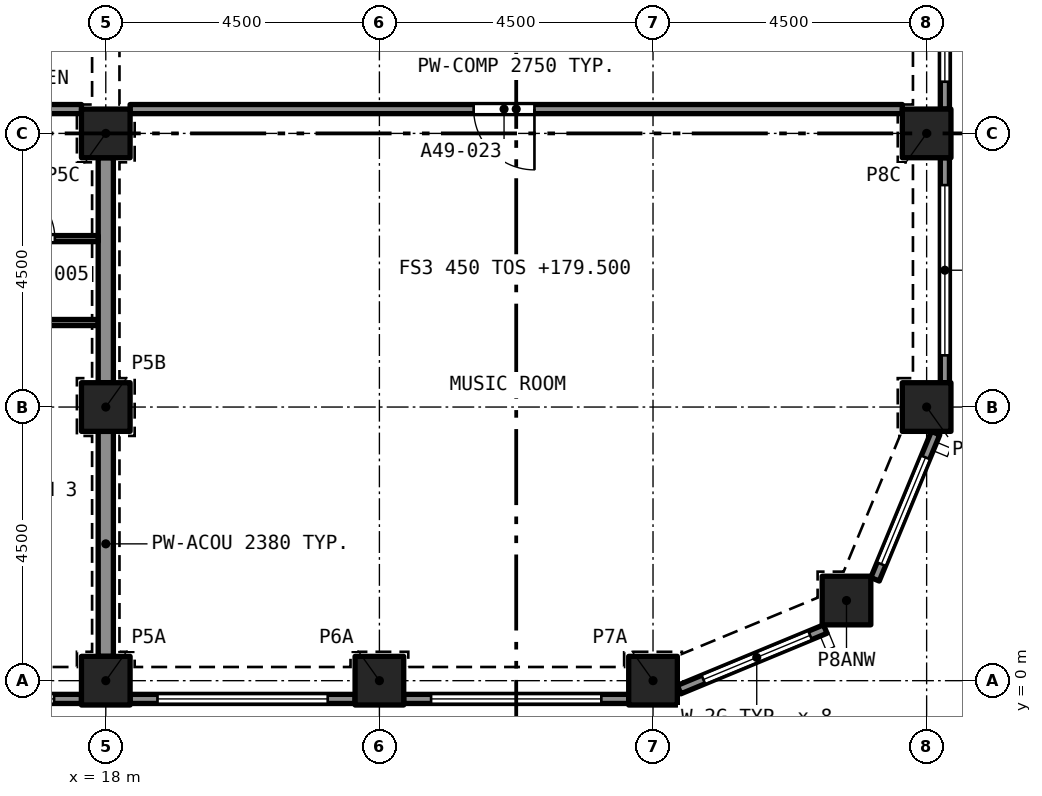
"""IFC4 building model, lengths in metres.
Left out: names, types, materials, properties, quantities, classifications, styles, units other than length and angle.
Written with IfcOpenShell. Run it as: python <this file> out.ifc"""

import sys

from ifc_helpers import new_model, si_unit, direction, frame, frame_2d, origin, origin_2d, place, context, subcontext, project, spatial, rectangle, extrude, element, fill, save


model = new_model("IFC4")
c1 = context("Model", 3, precision=1e-05, world=origin(), true_north=direction((0.0, 1.0)))
c2 = subcontext(c1, "Body", "Model", "MODEL_VIEW")
j1 = project(units=[si_unit("LENGTHUNIT", "METRE"), si_unit("PLANEANGLEUNIT", "RADIAN")], contexts=[c1])
p1 = place(None, origin())
s1 = spatial("IfcSite", under=j1, at=p1, CompositionType="ELEMENT")
p2 = place(p1, origin())
s2 = spatial("IfcBuilding", under=s1, at=p2, CompositionType="ELEMENT")
p3 = place(p2, frame((0.0, 0.0, 179.5)))
s3 = spatial("IfcBuildingStorey", under=s2, at=p3, CompositionType="ELEMENT", Elevation=179.5)
for number, where, z_axis, x_axis in (
    (1, (18.0, 0.0, 0.0), (0.0, 0.0, 1.0), (1.0, 0.0, 0.0)),
    (2, (22.5, 0.0, 0.0), (0.0, 0.0, 1.0), (1.0, 0.0, 0.0)),
    (3, (27.0, 0.0, 0.0), (0.0, 0.0, 1.0), (1.0, 0.0, 0.0)),
    (4, (30.182, 1.318, 0.0), (0.0, 0.0, 1.0), (1.0, 0.0, 0.0)),
    (5, (18.0, 4.5, 0.0), (0.0, 0.0, 1.0), (1.0, 0.0, 0.0)),
    (6, (31.5, 4.5, 0.0), (0.0, 0.0, 1.0), (1.0, 0.0, 0.0)),
    (7, (18.0, 9.0, 0.0), (0.0, 0.0, 1.0), (1.0, 0.0, 0.0)),
    (8, (31.5, 9.0, 0.0), (0.0, 0.0, 1.0), (1.0, 0.0, 0.0)),
):
    element("IfcColumn", number, at=place(p3, frame(where, z_axis=z_axis, x_axis=x_axis)), inside=s3, PredefinedType="COLUMN", context=c2, shape_type="SweptSolid", body=[
        extrude(rectangle(XDim=0.8, YDim=0.8, at=origin_2d()), origin(), (0.0, 0.0, 1.0), 3.2),
    ])
p4 = place(p3, frame((29.833, 0.849, 0.0), z_axis=(0.0, 0.0, 1.0), x_axis=(-0.923885342263, -0.382669406082, 0.0)))
e9 = element("IfcWall", 9, at=p4, inside=s3, PredefinedType="SOLIDWALL", context=c2, shape_type="SweptSolid", body=[
    extrude(rectangle(XDim=2.602, YDim=0.15, at=frame_2d((1.301, 0.0))), origin(), (0.0, 0.0, 1.0), 3.2),
])
p5 = place(p4, frame((0.27, 0.0, 0.45)))
e10 = element("IfcOpeningElement", 10, at=p5, cuts=e9, PredefinedType="OPENING", context=c2, shape_type="SweptSolid", body=[
    extrude(rectangle(XDim=1.9, YDim=1.95, at=frame_2d((0.95, 0.975))), frame((0.0, 0.085, 0.0), z_axis=(0.0, -1.0, 0.0), x_axis=(1.0, 0.0, 0.0)), (0.0, 0.0, 1.0), 0.17),
])
p6 = place(p3, frame((31.647, 4.071, 0.0), z_axis=(0.0, 0.0, 1.0), x_axis=(-0.382669406082, -0.923885342263, 0.0)))
e11 = element("IfcWall", 11, at=p6, inside=s3, PredefinedType="SOLIDWALL", context=c2, shape_type="SweptSolid", body=[
    extrude(rectangle(XDim=2.602, YDim=0.15, at=frame_2d((1.301, 0.0))), origin(), (0.0, 0.0, 1.0), 3.2),
])
p7 = place(p6, frame((0.432, 0.0, 0.45)))
e12 = element("IfcOpeningElement", 12, at=p7, cuts=e11, PredefinedType="OPENING", context=c2, shape_type="SweptSolid", body=[
    extrude(rectangle(XDim=1.9, YDim=1.95, at=frame_2d((0.95, 0.975))), frame((0.0, 0.085, 0.0), z_axis=(0.0, -1.0, 0.0), x_axis=(1.0, 0.0, 0.0)), (0.0, 0.0, 1.0), 0.17),
])
p8 = place(p3, frame((31.8, 8.6, 0.0), z_axis=(0.0, 0.0, 1.0), x_axis=(0.0, -1.0, 0.0)))
e13 = element("IfcWall", 13, at=p8, inside=s3, PredefinedType="SOLIDWALL", context=c2, shape_type="SweptSolid", body=[
    extrude(rectangle(XDim=3.7, YDim=0.15, at=frame_2d((1.85, 0.0))), origin(), (0.0, 0.0, 1.0), 3.2),
])
p9 = place(p8, frame((0.45, 0.0, 0.45)))
e14 = element("IfcOpeningElement", 14, at=p9, cuts=e13, PredefinedType="OPENING", context=c2, shape_type="SweptSolid", body=[
    extrude(rectangle(XDim=2.8, YDim=1.95, at=frame_2d((1.4, 0.975))), frame((0.0, 0.085, 0.0), z_axis=(0.0, -1.0, 0.0), x_axis=(1.0, 0.0, 0.0)), (0.0, 0.0, 1.0), 0.17),
])
p10 = place(p3, frame((31.8, 13.1, 0.0), z_axis=(0.0, 0.0, 1.0), x_axis=(0.0, -1.0, 0.0)))
e15 = element("IfcWall", 15, at=p10, inside=s3, PredefinedType="SOLIDWALL", context=c2, shape_type="SweptSolid", body=[
    extrude(rectangle(XDim=3.7, YDim=0.15, at=frame_2d((1.85, 0.0))), origin(), (0.0, 0.0, 1.0), 3.2),
])
p11 = place(p10, frame((0.45, 0.0, 0.45)))
e16 = element("IfcOpeningElement", 16, at=p11, cuts=e15, PredefinedType="OPENING", context=c2, shape_type="SweptSolid", body=[
    extrude(rectangle(XDim=2.8, YDim=1.95, at=frame_2d((1.4, 0.975))), frame((0.0, 0.085, 0.0), z_axis=(0.0, -1.0, 0.0), x_axis=(1.0, 0.0, 0.0)), (0.0, 0.0, 1.0), 0.17),
])
p12 = place(p3, frame((17.6, -0.3, 0.0), z_axis=(0.0, 0.0, 1.0), x_axis=(-1.0, 0.0, 0.0)))
e17 = element("IfcWall", 17, at=p12, inside=s3, PredefinedType="SOLIDWALL", context=c2, shape_type="SweptSolid", body=[
    extrude(rectangle(XDim=3.7, YDim=0.15, at=frame_2d((1.85, 0.0))), origin(), (0.0, 0.0, 1.0), 3.2),
])
p13 = place(p12, frame((0.45, 0.0, 0.45)))
e18 = element("IfcOpeningElement", 18, at=p13, cuts=e17, PredefinedType="OPENING", context=c2, shape_type="SweptSolid", body=[
    extrude(rectangle(XDim=2.8, YDim=1.95, at=frame_2d((1.4, 0.975))), frame((0.0, 0.085, 0.0), z_axis=(0.0, -1.0, 0.0), x_axis=(1.0, 0.0, 0.0)), (0.0, 0.0, 1.0), 0.17),
])
p14 = place(p3, frame((22.1, -0.3, 0.0), z_axis=(0.0, 0.0, 1.0), x_axis=(-1.0, 0.0, 0.0)))
e19 = element("IfcWall", 19, at=p14, inside=s3, PredefinedType="SOLIDWALL", context=c2, shape_type="SweptSolid", body=[
    extrude(rectangle(XDim=3.7, YDim=0.15, at=frame_2d((1.85, 0.0))), origin(), (0.0, 0.0, 1.0), 3.2),
])
p15 = place(p14, frame((0.45, 0.0, 0.45)))
e20 = element("IfcOpeningElement", 20, at=p15, cuts=e19, PredefinedType="OPENING", context=c2, shape_type="SweptSolid", body=[
    extrude(rectangle(XDim=2.8, YDim=1.95, at=frame_2d((1.4, 0.975))), frame((0.0, 0.085, 0.0), z_axis=(0.0, -1.0, 0.0), x_axis=(1.0, 0.0, 0.0)), (0.0, 0.0, 1.0), 0.17),
])
p16 = place(p3, frame((26.6, -0.3, 0.0), z_axis=(0.0, 0.0, 1.0), x_axis=(-1.0, 0.0, 0.0)))
e21 = element("IfcWall", 21, at=p16, inside=s3, PredefinedType="SOLIDWALL", context=c2, shape_type="SweptSolid", body=[
    extrude(rectangle(XDim=3.7, YDim=0.15, at=frame_2d((1.85, 0.0))), origin(), (0.0, 0.0, 1.0), 3.2),
])
p17 = place(p16, frame((0.45, 0.0, 0.45)))
e22 = element("IfcOpeningElement", 22, at=p17, cuts=e21, PredefinedType="OPENING", context=c2, shape_type="SweptSolid", body=[
    extrude(rectangle(XDim=2.8, YDim=1.95, at=frame_2d((1.4, 0.975))), frame((0.0, 0.085, 0.0), z_axis=(0.0, -1.0, 0.0), x_axis=(1.0, 0.0, 0.0)), (0.0, 0.0, 1.0), 0.17),
])
p18 = place(p3, frame((17.875, 5.89, 0.0), z_axis=(0.0, 0.0, 1.0), x_axis=(-1.0, 0.0, 0.0)))
e23 = element("IfcWall", 23, at=p18, inside=s3, PredefinedType="PARTITIONING", context=c2, shape_type="SweptSolid", body=[
    extrude(rectangle(XDim=4.375, YDim=0.1, at=frame_2d((2.188, 0.0))), origin(), (0.0, 0.0, 1.0), 2.9),
])
p19 = place(p18, frame((1.675, 0.0, 0.0)))
e24 = element("IfcOpeningElement", 24, at=p19, cuts=e23, PredefinedType="OPENING", context=c2, shape_type="SweptSolid", body=[
    extrude(rectangle(XDim=0.9, YDim=2.1, at=frame_2d((0.45, 1.05))), frame((0.0, 0.06, 0.0), z_axis=(0.0, -1.0, 0.0), x_axis=(1.0, 0.0, 0.0)), (0.0, 0.0, 1.0), 0.12),
])
for number, where, z_axis, x_axis in (
    (25, (18.0, 4.9, 0.0), (0.0, 0.0, 1.0), (0.0, 1.0, 0.0)),
    (26, (18.0, 0.4, 0.0), (0.0, 0.0, 1.0), (0.0, 1.0, 0.0)),
):
    element("IfcWall", number, at=place(p3, frame(where, z_axis=z_axis, x_axis=x_axis)), inside=s3, PredefinedType="PARTITIONING", context=c2, shape_type="SweptSolid", body=[
        extrude(rectangle(XDim=3.7, YDim=0.25, at=frame_2d((1.85, 0.0))), origin(), (0.0, 0.0, 1.0), 2.38),
    ])
p20 = place(p3, frame((15.375, 7.27, 0.0), z_axis=(0.0, 0.0, 1.0), x_axis=(1.0, 0.0, 0.0)))
e27 = element("IfcWall", 27, at=p20, inside=s3, PredefinedType="PARTITIONING", context=c2, shape_type="SweptSolid", body=[
    extrude(rectangle(XDim=2.5, YDim=0.1, at=frame_2d((1.25, 0.0))), origin(), (0.0, 0.0, 1.0), 2.9),
])
p21 = place(p20, frame((0.887, 0.0, 0.0)))
e28 = element("IfcOpeningElement", 28, at=p21, cuts=e27, PredefinedType="OPENING", context=c2, shape_type="SweptSolid", body=[
    extrude(rectangle(XDim=0.9, YDim=2.1, at=frame_2d((0.45, 1.05))), frame((0.0, 0.06, 0.0), z_axis=(0.0, -1.0, 0.0), x_axis=(1.0, 0.0, 0.0)), (0.0, 0.0, 1.0), 0.12),
])
p22 = place(p3, frame((15.425, 9.4, 0.0), z_axis=(0.0, 0.0, 1.0), x_axis=(1.0, 0.0, 0.0)))
e29 = element("IfcWall", 29, at=p22, inside=s3, PredefinedType="PARTITIONING", context=c2, shape_type="SweptSolid", body=[
    extrude(rectangle(XDim=2.175, YDim=0.15, at=frame_2d((1.087, 0.0))), origin(), (0.0, 0.0, 1.0), 2.9),
])
p23 = place(p3, frame((31.1, 9.4, 0.0), z_axis=(0.0, 0.0, 1.0), x_axis=(-1.0, 0.0, 0.0)))
e30 = element("IfcWall", 30, at=p23, inside=s3, PredefinedType="PARTITIONING", context=c2, shape_type="SweptSolid", body=[
    extrude(rectangle(XDim=12.7, YDim=0.15, at=frame_2d((6.35, 0.0))), origin(), (0.0, 0.0, 1.0), 2.75),
])
p24 = place(p23, frame((6.05, 0.0, 0.0)))
e31 = element("IfcOpeningElement", 31, at=p24, cuts=e30, PredefinedType="OPENING", context=c2, shape_type="SweptSolid", body=[
    extrude(rectangle(XDim=1.0, YDim=2.1, at=frame_2d((0.5, 1.05))), frame((0.0, 0.085, 0.0), z_axis=(0.0, -1.0, 0.0), x_axis=(1.0, 0.0, 0.0)), (0.0, 0.0, 1.0), 0.17),
])
p25 = place(p5, origin())
e32 = element("IfcWindow", 32, at=p25, inside=s3, PartitioningType="SINGLE_PANEL", PredefinedType="WINDOW", context=c2, shape_type="SweptSolid", body=[
    extrude(rectangle(XDim=1.9, YDim=1.95, at=frame_2d((0.95, 0.975))), frame((0.0, 0.03, 0.0), z_axis=(0.0, -1.0, 0.0), x_axis=(1.0, 0.0, 0.0)), (0.0, 0.0, 1.0), 0.06),
])
fill(e10, e32)
p26 = place(p7, origin())
e33 = element("IfcWindow", 33, at=p26, inside=s3, PartitioningType="SINGLE_PANEL", PredefinedType="WINDOW", context=c2, shape_type="SweptSolid", body=[
    extrude(rectangle(XDim=1.9, YDim=1.95, at=frame_2d((0.95, 0.975))), frame((0.0, 0.03, 0.0), z_axis=(0.0, -1.0, 0.0), x_axis=(1.0, 0.0, 0.0)), (0.0, 0.0, 1.0), 0.06),
])
fill(e12, e33)
p27 = place(p9, origin())
e34 = element("IfcWindow", 34, at=p27, inside=s3, PartitioningType="SINGLE_PANEL", PredefinedType="WINDOW", context=c2, shape_type="SweptSolid", body=[
    extrude(rectangle(XDim=2.8, YDim=1.95, at=frame_2d((1.4, 0.975))), frame((0.0, 0.03, 0.0), z_axis=(0.0, -1.0, 0.0), x_axis=(1.0, 0.0, 0.0)), (0.0, 0.0, 1.0), 0.06),
])
fill(e14, e34)
p28 = place(p11, origin())
e35 = element("IfcWindow", 35, at=p28, inside=s3, PartitioningType="SINGLE_PANEL", PredefinedType="WINDOW", context=c2, shape_type="SweptSolid", body=[
    extrude(rectangle(XDim=2.8, YDim=1.95, at=frame_2d((1.4, 0.975))), frame((0.0, 0.03, 0.0), z_axis=(0.0, -1.0, 0.0), x_axis=(1.0, 0.0, 0.0)), (0.0, 0.0, 1.0), 0.06),
])
fill(e16, e35)
p29 = place(p13, origin())
e36 = element("IfcWindow", 36, at=p29, inside=s3, PartitioningType="SINGLE_PANEL", PredefinedType="WINDOW", context=c2, shape_type="SweptSolid", body=[
    extrude(rectangle(XDim=2.8, YDim=1.95, at=frame_2d((1.4, 0.975))), frame((0.0, 0.03, 0.0), z_axis=(0.0, -1.0, 0.0), x_axis=(1.0, 0.0, 0.0)), (0.0, 0.0, 1.0), 0.06),
])
fill(e18, e36)
p30 = place(p15, origin())
e37 = element("IfcWindow", 37, at=p30, inside=s3, PartitioningType="SINGLE_PANEL", PredefinedType="WINDOW", context=c2, shape_type="SweptSolid", body=[
    extrude(rectangle(XDim=2.8, YDim=1.95, at=frame_2d((1.4, 0.975))), frame((0.0, 0.03, 0.0), z_axis=(0.0, -1.0, 0.0), x_axis=(1.0, 0.0, 0.0)), (0.0, 0.0, 1.0), 0.06),
])
fill(e20, e37)
p31 = place(p17, origin())
e38 = element("IfcWindow", 38, at=p31, inside=s3, PartitioningType="SINGLE_PANEL", PredefinedType="WINDOW", context=c2, shape_type="SweptSolid", body=[
    extrude(rectangle(XDim=2.8, YDim=1.95, at=frame_2d((1.4, 0.975))), frame((0.0, 0.03, 0.0), z_axis=(0.0, -1.0, 0.0), x_axis=(1.0, 0.0, 0.0)), (0.0, 0.0, 1.0), 0.06),
])
fill(e22, e38)
p32 = place(p21, origin())
e39 = element("IfcDoor", 39, at=p32, inside=s3, OperationType="SINGLE_SWING_RIGHT", PredefinedType="DOOR", context=c2, shape_type="SweptSolid", body=[
    extrude(rectangle(XDim=0.9, YDim=2.1, at=frame_2d((0.45, 1.05))), frame((0.0, 0.025, 0.0), z_axis=(0.0, -1.0, 0.0), x_axis=(1.0, 0.0, 0.0)), (0.0, 0.0, 1.0), 0.05),
])
fill(e28, e39)
p33 = place(p24, origin())
e40 = element("IfcDoor", 40, at=p33, inside=s3, OperationType="SINGLE_SWING_RIGHT", PredefinedType="DOOR", context=c2, shape_type="SweptSolid", body=[
    extrude(rectangle(XDim=1.0, YDim=2.1, at=frame_2d((0.5, 1.05))), frame((0.0, 0.025, 0.0), z_axis=(0.0, -1.0, 0.0), x_axis=(1.0, 0.0, 0.0)), (0.0, 0.0, 1.0), 0.05),
])
fill(e31, e40)
save(model, sys.argv[1])
